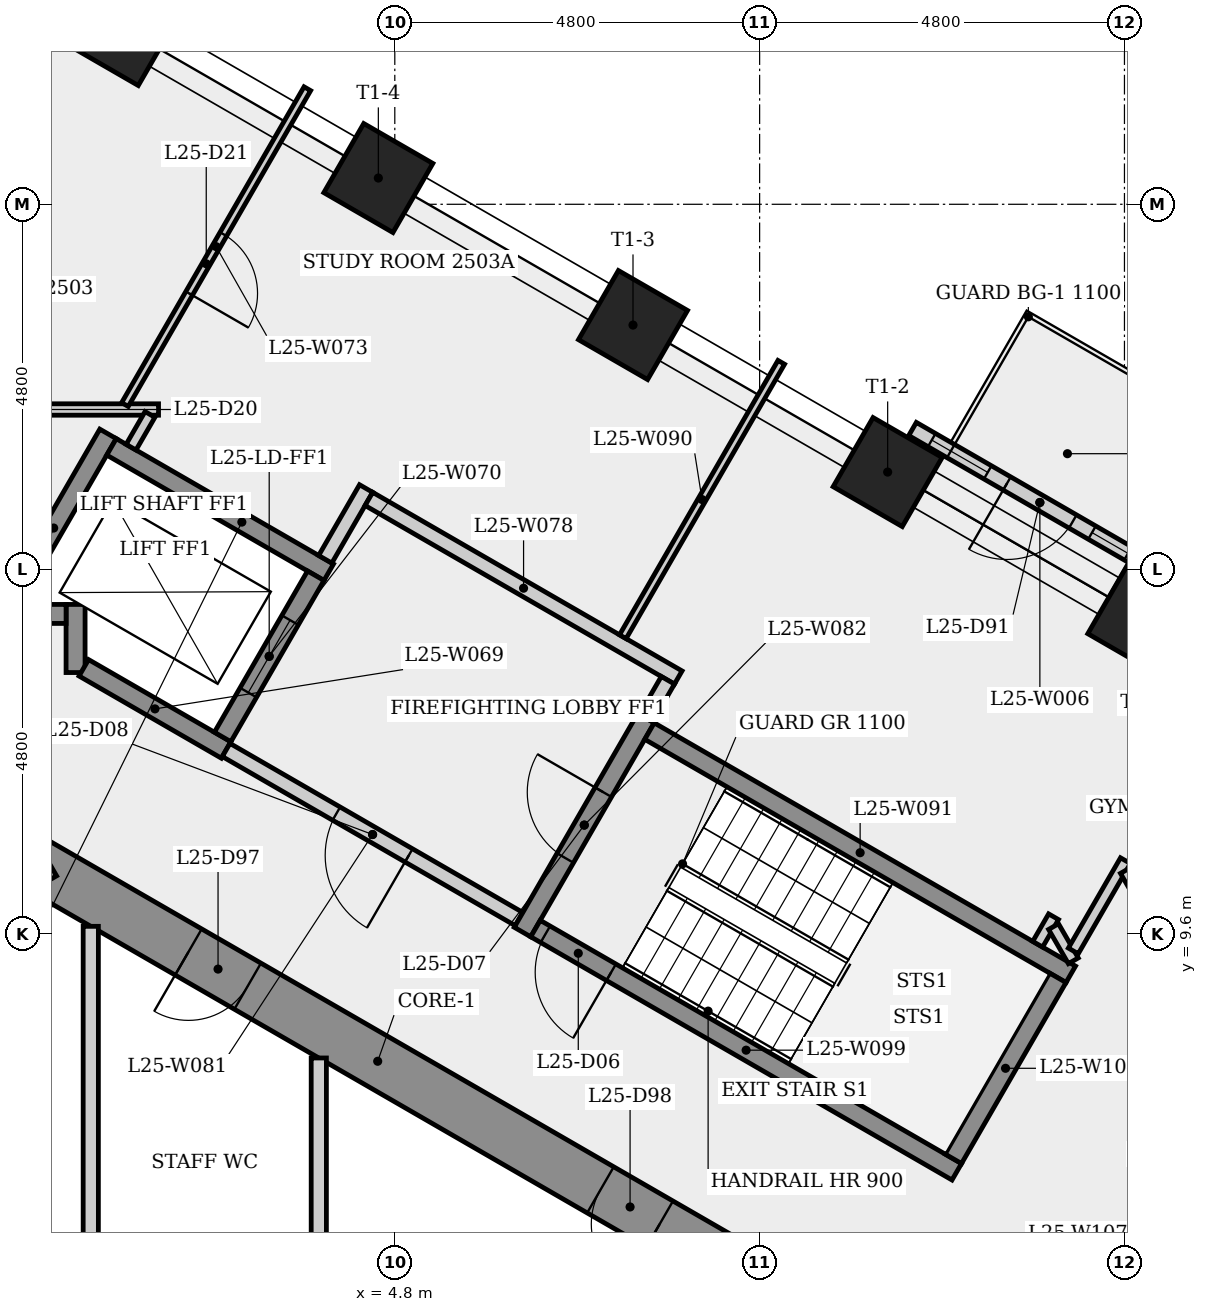
"""IFC4 building model, lengths in metres.
Left out: names, types, materials, properties, quantities, classifications, styles, units other than length and angle.
Written with IfcOpenShell. Run it as: python <this file> out.ifc"""

import sys

from ifc_helpers import new_model, si_unit, direction, frame, frame_2d, origin, origin_2d, place, context, subcontext, project, spatial, rectangle, extrude, element, fill, save


model = new_model("IFC4")
c1 = context("Model", 3, precision=1e-05, world=origin(), true_north=direction((0.0, 1.0)))
c2 = subcontext(c1, "Body", "Model", "MODEL_VIEW")
j1 = project(units=[si_unit("LENGTHUNIT", "METRE"), si_unit("PLANEANGLEUNIT", "RADIAN")], contexts=[c1])
p1 = place(None, origin())
s1 = spatial("IfcSite", under=j1, at=p1, CompositionType="ELEMENT")
p2 = place(p1, origin())
s2 = spatial("IfcBuilding", under=s1, at=p2, CompositionType="ELEMENT")
p3 = place(p2, frame((0.0, 0.0, 96.7)))
s3 = spatial("IfcBuildingStorey", under=s2, at=p3, CompositionType="ELEMENT", Elevation=96.7)
p4 = place(p3, frame((9.325, 5.182, 0.0), z_axis=(0.0, 0.0, 1.0), x_axis=(-0.866023993627, 0.500002442456, 0.0)))
e1 = element("IfcWall", 1, at=p4, inside=s3, PredefinedType="SHEAR", context=c2, shape_type="SweptSolid", body=[
    extrude(rectangle(XDim=10.97, YDim=0.7, at=frame_2d((5.485, 0.0))), origin(), (0.0, 0.0, 1.0), 3.4),
])
p5 = place(p4, frame((7.46, 0.0, 0.0)))
e2 = element("IfcOpeningElement", 2, at=p5, cuts=e1, PredefinedType="OPENING", context=c2, shape_type="SweptSolid", body=[
    extrude(rectangle(XDim=0.9, YDim=2.1, at=frame_2d((0.45, 1.05))), frame((0.0, 0.36, 0.0), z_axis=(0.0, -1.0, 0.0), x_axis=(1.0, 0.0, 0.0)), (0.0, 0.0, 1.0), 0.72),
])
p6 = place(p4, frame((1.201, 0.0, 0.0)))
e3 = element("IfcOpeningElement", 3, at=p6, cuts=e1, PredefinedType="OPENING", context=c2, shape_type="SweptSolid", body=[
    extrude(rectangle(XDim=0.9, YDim=2.1, at=frame_2d((0.45, 1.05))), frame((0.0, 0.36, 0.0), z_axis=(0.0, -1.0, 0.0), x_axis=(1.0, 0.0, 0.0)), (0.0, 0.0, 1.0), 0.72),
])
p7 = place(p3, frame((0.175, 10.667, 0.0), z_axis=(0.0, 0.0, 1.0), x_axis=(-0.866023993627, -0.500002442456, 0.0)))
e4 = element("IfcWall", 4, at=p7, inside=s3, PredefinedType="SHEAR", context=c2, shape_type="SweptSolid", body=[
    extrude(rectangle(XDim=10.97, YDim=0.7, at=frame_2d((5.485, 0.0))), origin(), (0.0, 0.0, 1.0), 3.4),
])
p8 = place(p7, frame((6.214, 0.0, 0.0)))
e5 = element("IfcOpeningElement", 5, at=p8, cuts=e4, PredefinedType="OPENING", context=c2, shape_type="SweptSolid", body=[
    extrude(rectangle(XDim=0.9, YDim=2.1, at=frame_2d((0.45, 1.05))), frame((0.0, 0.36, 0.0), z_axis=(0.0, -1.0, 0.0), x_axis=(1.0, 0.0, 0.0)), (0.0, 0.0, 1.0), 0.72),
])
for number, where, z_axis, x_axis in (
    (6, (14.635, 13.742, 0.0), (0.0, 0.0, 1.0), (0.5, 0.866, 0.0)),
    (7, (11.284, 15.677, 0.0), (0.0, 0.0, 1.0), (0.5, 0.866, 0.0)),
    (8, (7.934, 17.611, 0.0), (0.0, 0.0, 1.0), (0.5, 0.866, 0.0)),
    (9, (4.583, 19.545, 0.0), (0.0, 0.0, 1.0), (0.5, 0.866, 0.0)),
    (10, (1.233, 21.48, 0.0), (0.0, 0.0, 1.0), (0.5, 0.866, 0.0)),
):
    element("IfcColumn", number, at=place(p3, frame(where, z_axis=z_axis, x_axis=x_axis)), inside=s3, PredefinedType="COLUMN", context=c2, shape_type="SweptSolid", body=[
        extrude(rectangle(XDim=1.05, YDim=1.05, at=origin_2d()), origin(), (0.0, 0.0, 1.0), 3.4),
    ])
p9 = place(p3, frame((14.962, 14.309, 0.0), z_axis=(0.0, 0.0, 1.0), x_axis=(-0.866013246922, 0.500021055713, 0.0)))
e11 = element("IfcWall", 11, at=p9, inside=s3, PredefinedType="SOLIDWALL", context=c2, shape_type="SweptSolid", body=[
    extrude(rectangle(XDim=3.869, YDim=0.2, at=frame_2d((1.935, 0.0))), origin(), (0.0, 0.0, 1.0), 3.4),
])
p10 = place(p9, frame((1.435, 0.0, 0.0)))
e12 = element("IfcOpeningElement", 12, at=p10, cuts=e11, PredefinedType="OPENING", context=c2, shape_type="SweptSolid", body=[
    extrude(rectangle(XDim=1.0, YDim=2.4, at=frame_2d((0.5, 1.2))), frame((0.0, 0.11, 0.0), z_axis=(0.0, -1.0, 0.0), x_axis=(1.0, 0.0, 0.0)), (0.0, 0.0, 1.0), 0.22),
])
p11 = place(p9, frame((0.292, 0.0, 0.9)))
e13 = element("IfcOpeningElement", 13, at=p11, cuts=e11, PredefinedType="OPENING", context=c2, shape_type="SweptSolid", body=[
    extrude(rectangle(XDim=0.85, YDim=1.5, at=frame_2d((0.425, 0.75))), frame((0.0, 0.11, 0.0), z_axis=(0.0, -1.0, 0.0), x_axis=(1.0, 0.0, 0.0)), (0.0, 0.0, 1.0), 0.22),
])
p12 = place(p9, frame((2.727, 0.0, 0.9)))
e14 = element("IfcOpeningElement", 14, at=p12, cuts=e11, PredefinedType="OPENING", context=c2, shape_type="SweptSolid", body=[
    extrude(rectangle(XDim=0.85, YDim=1.5, at=frame_2d((0.425, 0.75))), frame((0.0, 0.11, 0.0), z_axis=(0.0, -1.0, 0.0), x_axis=(1.0, 0.0, 0.0)), (0.0, 0.0, 1.0), 0.22),
])
p13 = place(p3, frame((-3.275, 16.5, 0.0), z_axis=(0.0, 0.0, 1.0), x_axis=(1.0, 0.0, 0.0)))
e15 = element("IfcWall", 15, at=p13, inside=s3, PredefinedType="PARTITIONING", context=c2, shape_type="SweptSolid", body=[
    extrude(rectangle(XDim=4.966, YDim=0.15, at=frame_2d((2.483, 0.0))), origin(), (0.0, 0.0, 1.0), 3.05),
])
p14 = place(p13, frame((1.82, 0.0, 0.0)))
e16 = element("IfcOpeningElement", 16, at=p14, cuts=e15, PredefinedType="OPENING", context=c2, shape_type="SweptSolid", body=[
    extrude(rectangle(XDim=1.0, YDim=2.1, at=frame_2d((0.5, 1.05))), frame((0.0, 0.085, 0.0), z_axis=(0.0, -1.0, 0.0), x_axis=(1.0, 0.0, 0.0)), (0.0, 0.0, 1.0), 0.17),
])
p15 = place(p3, frame((-0.403, 13.702, 0.0), z_axis=(0.0, 0.0, 1.0), x_axis=(0.499976111731, 0.866039195244, 0.0)))
e17 = element("IfcWall", 17, at=p15, inside=s3, PredefinedType="SHEAR", context=c2, shape_type="SweptSolid", body=[
    extrude(rectangle(XDim=2.861, YDim=0.25, at=frame_2d((1.43, 0.0))), origin(), (0.0, 0.0, 1.0), 3.05),
])
p16 = place(p3, frame((0.6, 13.039, 0.0), z_axis=(0.0, 0.0, 1.0), x_axis=(0.0, 1.0, 0.0)))
e18 = element("IfcWall", 18, at=p16, inside=s3, PredefinedType="SHEAR", context=c2, shape_type="SweptSolid", body=[
    extrude(rectangle(XDim=0.896, YDim=0.25, at=frame_2d((0.448, 0.0))), origin(), (0.0, 0.0, 1.0), 3.05),
])
p17 = place(p3, frame((0.475, 13.81, 0.0), z_axis=(0.0, 0.0, 1.0), x_axis=(-1.0, 0.0, 0.0)))
e19 = element("IfcWall", 19, at=p17, inside=s3, PredefinedType="SHEAR", context=c2, shape_type="SweptSolid", body=[
    extrude(rectangle(XDim=0.691, YDim=0.25, at=frame_2d((0.345, 0.0))), origin(), (0.0, 0.0, 1.0), 3.4),
])
p18 = place(p3, frame((0.8, 9.699, 0.0), z_axis=(0.0, 0.0, 1.0), x_axis=(0.0, -1.0, 0.0)))
e20 = element("IfcWall", 20, at=p18, inside=s3, PredefinedType="PARTITIONING", context=c2, shape_type="SweptSolid", body=[
    extrude(rectangle(XDim=4.425, YDim=0.2, at=frame_2d((2.212, 0.0))), origin(), (0.0, 0.0, 1.0), 3.05),
])
p19 = place(p3, frame((1.073, 16.008, 0.0), z_axis=(0.0, 0.0, 1.0), x_axis=(0.866040211805, -0.499974350878, 0.0)))
e21 = element("IfcWall", 21, at=p19, inside=s3, PredefinedType="SHEAR", context=c2, shape_type="SweptSolid", body=[
    extrude(rectangle(XDim=3.3, YDim=0.25, at=frame_2d((1.65, 0.0))), origin(), (0.0, 0.0, 1.0), 3.05),
])
p20 = place(p3, frame((1.579, 16.435, 0.0), z_axis=(0.0, 0.0, 1.0), x_axis=(-0.500359323436, -0.865817848887, 0.0)))
e22 = element("IfcWall", 22, at=p20, inside=s3, PredefinedType="PARTITIONING", context=c2, shape_type="SweptSolid", body=[
    extrude(rectangle(XDim=0.498, YDim=0.15, at=frame_2d((0.249, 0.0))), origin(), (0.0, 0.0, 1.0), 3.05),
])
p21 = place(p3, frame((2.581, 12.02, 0.0), z_axis=(0.0, 0.0, 1.0), x_axis=(-0.86603892542, 0.499976579108, 0.0)))
e23 = element("IfcWall", 23, at=p21, inside=s3, PredefinedType="SHEAR", context=c2, shape_type="SweptSolid", body=[
    extrude(rectangle(XDim=2.162, YDim=0.25, at=frame_2d((1.081, 0.0))), origin(), (0.0, 0.0, 1.0), 3.05),
])
p22 = place(p3, frame((2.535, 12.191, 0.0), z_axis=(0.0, 0.0, 1.0), x_axis=(0.500061746146, 0.865989751695, 0.0)))
e24 = element("IfcWall", 24, at=p22, inside=s3, PredefinedType="SHEAR", context=c2, shape_type="SweptSolid", body=[
    extrude(rectangle(XDim=2.45, YDim=0.25, at=frame_2d((1.225, 0.0))), origin(), (0.0, 0.0, 1.0), 3.4),
])
p23 = place(p22, frame((0.675, 0.0, 0.0)))
e25 = element("IfcOpeningElement", 25, at=p23, cuts=e24, PredefinedType="OPENING", context=c2, shape_type="SweptSolid", body=[
    extrude(rectangle(XDim=1.1, YDim=2.1, at=frame_2d((0.55, 1.05))), frame((0.0, 0.135, 0.0), z_axis=(0.0, -1.0, 0.0), x_axis=(1.0, 0.0, 0.0)), (0.0, 0.0, 1.0), 0.27),
])
p24 = place(p3, frame((3.649, 20.721, 0.0), z_axis=(0.0, 0.0, 1.0), x_axis=(-0.499991085587, -0.866030550462, 0.0)))
e26 = element("IfcWall", 26, at=p24, inside=s3, PredefinedType="PARTITIONING", context=c2, shape_type="SweptSolid", body=[
    extrude(rectangle(XDim=4.799, YDim=0.1, at=frame_2d((2.399, 0.0))), origin(), (0.0, 0.0, 1.0), 3.05),
])
p25 = place(p24, frame((2.21, 0.0, 0.0)))
e27 = element("IfcOpeningElement", 27, at=p25, cuts=e26, PredefinedType="OPENING", context=c2, shape_type="SweptSolid", body=[
    extrude(rectangle(XDim=0.9, YDim=2.1, at=frame_2d((0.45, 1.05))), frame((0.0, 0.06, 0.0), z_axis=(0.0, -1.0, 0.0), x_axis=(1.0, 0.0, 0.0)), (0.0, 0.0, 1.0), 0.12),
])
p26 = place(p3, frame((3.8, 7.967, 0.0), z_axis=(0.0, 0.0, 1.0), x_axis=(0.0, -1.0, 0.0)))
e28 = element("IfcWall", 28, at=p26, inside=s3, PredefinedType="PARTITIONING", context=c2, shape_type="SweptSolid", body=[
    extrude(rectangle(XDim=2.692, YDim=0.2, at=frame_2d((1.346, 0.0))), origin(), (0.0, 0.0, 1.0), 3.05),
])
p27 = place(p3, frame((3.885, 14.529, 0.0), z_axis=(0.0, 0.0, 1.0), x_axis=(0.499997628298, 0.866026773083, 0.0)))
e29 = element("IfcWall", 29, at=p27, inside=s3, PredefinedType="PARTITIONING", context=c2, shape_type="SweptSolid", body=[
    extrude(rectangle(XDim=1.075, YDim=0.2, at=frame_2d((0.538, 0.0))), origin(), (0.0, 0.0, 1.0), 3.05),
])
p28 = place(p3, frame((4.459, 15.323, 0.0), z_axis=(0.0, 0.0, 1.0), x_axis=(0.866016039709, -0.500016218704, 0.0)))
e30 = element("IfcWall", 30, at=p28, inside=s3, PredefinedType="PARTITIONING", context=c2, shape_type="SweptSolid", body=[
    extrude(rectangle(XDim=4.7, YDim=0.2, at=frame_2d((2.35, 0.0))), origin(), (0.0, 0.0, 1.0), 3.05),
])
p29 = place(p3, frame((6.435, 9.795, 0.0), z_axis=(0.0, 0.0, 1.0), x_axis=(-0.866012907634, 0.500021643343, 0.0)))
e31 = element("IfcWall", 31, at=p29, inside=s3, PredefinedType="PARTITIONING", context=c2, shape_type="SweptSolid", body=[
    extrude(rectangle(XDim=4.45, YDim=0.2, at=frame_2d((2.225, 0.0))), origin(), (0.0, 0.0, 1.0), 3.05),
])
p30 = place(p29, frame((1.675, 0.0, 0.0)))
e32 = element("IfcOpeningElement", 32, at=p30, cuts=e31, PredefinedType="OPENING", context=c2, shape_type="SweptSolid", body=[
    extrude(rectangle(XDim=1.1, YDim=2.1, at=frame_2d((0.55, 1.05))), frame((0.0, 0.11, 0.0), z_axis=(0.0, -1.0, 0.0), x_axis=(1.0, 0.0, 0.0)), (0.0, 0.0, 1.0), 0.22),
])
p31 = place(p3, frame((6.48, 9.624, 0.0), z_axis=(0.0, 0.0, 1.0), x_axis=(0.500017246033, 0.866015446554, 0.0)))
e33 = element("IfcWall", 33, at=p31, inside=s3, PredefinedType="SHEAR", context=c2, shape_type="SweptSolid", body=[
    extrude(rectangle(XDim=3.25, YDim=0.25, at=frame_2d((1.625, 0.0))), origin(), (0.0, 0.0, 1.0), 3.05),
])
p32 = place(p31, frame((1.125, 0.0, 0.0)))
e34 = element("IfcOpeningElement", 34, at=p32, cuts=e33, PredefinedType="OPENING", context=c2, shape_type="SweptSolid", body=[
    extrude(rectangle(XDim=1.0, YDim=2.1, at=frame_2d((0.5, 1.05))), frame((0.0, 0.135, 0.0), z_axis=(0.0, -1.0, 0.0), x_axis=(1.0, 0.0, 0.0)), (0.0, 0.0, 1.0), 0.27),
])
p33 = place(p3, frame((7.8, 13.51, 0.0), z_axis=(0.0, 0.0, 1.0), x_axis=(0.499980976928, 0.866036386482, 0.0)))
e35 = element("IfcWall", 35, at=p33, inside=s3, PredefinedType="PARTITIONING", context=c2, shape_type="SweptSolid", body=[
    extrude(rectangle(XDim=4.169, YDim=0.1, at=frame_2d((2.084, 0.0))), origin(), (0.0, 0.0, 1.0), 3.05),
])
p34 = place(p3, frame((8.151, 12.268, 0.0), z_axis=(0.0, 0.0, 1.0), x_axis=(0.866025499775, -0.499999833739, 0.0)))
e36 = element("IfcWall", 36, at=p34, inside=s3, PredefinedType="SHEAR", context=c2, shape_type="SweptSolid", body=[
    extrude(rectangle(XDim=6.4, YDim=0.25, at=frame_2d((3.2, 0.0))), origin(), (0.0, 0.0, 1.0), 3.05),
])
p35 = place(p3, frame((8.393, 12.937, 0.0), z_axis=(0.0, 0.0, 1.0), x_axis=(-0.500065409566, -0.86598763626, 0.0)))
e37 = element("IfcWall", 37, at=p35, inside=s3, PredefinedType="PARTITIONING", context=c2, shape_type="SweptSolid", body=[
    extrude(rectangle(XDim=0.575, YDim=0.2, at=frame_2d((0.288, 0.0))), origin(), (0.0, 0.0, 1.0), 3.05),
])
p36 = place(p3, frame((12.194, 6.47, 0.0), z_axis=(0.0, 0.0, 1.0), x_axis=(-0.866025499775, 0.499999833739, 0.0)))
e38 = element("IfcWall", 38, at=p36, inside=s3, PredefinedType="SHEAR", context=c2, shape_type="SweptSolid", body=[
    extrude(rectangle(XDim=6.4, YDim=0.25, at=frame_2d((3.2, 0.0))), origin(), (0.0, 0.0, 1.0), 3.05),
])
p37 = place(p36, frame((5.25, 0.0, 0.0)))
e39 = element("IfcOpeningElement", 39, at=p37, cuts=e38, PredefinedType="OPENING", context=c2, shape_type="SweptSolid", body=[
    extrude(rectangle(XDim=1.0, YDim=2.1, at=frame_2d((0.5, 1.05))), frame((0.0, 0.135, 0.0), z_axis=(0.0, -1.0, 0.0), x_axis=(1.0, 0.0, 0.0)), (0.0, 0.0, 1.0), 0.27),
])
p38 = place(p3, frame((13.258, 9.464, 0.0), z_axis=(0.0, 0.0, 1.0), x_axis=(0.49990781971, 0.866078617559, 0.0)))
e40 = element("IfcWall", 40, at=p38, inside=s3, PredefinedType="PARTITIONING", context=c2, shape_type="SweptSolid", body=[
    extrude(rectangle(XDim=0.418, YDim=0.15, at=frame_2d((0.209, 0.0))), origin(), (0.0, 0.0, 1.0), 3.05),
])
p39 = place(p3, frame((13.467, 9.696, 0.0), z_axis=(0.0, 0.0, 1.0), x_axis=(0.499980071345, -0.866036909293, 0.0)))
e41 = element("IfcWall", 41, at=p39, inside=s3, PredefinedType="PARTITIONING", context=c2, shape_type="SweptSolid", body=[
    extrude(rectangle(XDim=0.52, YDim=0.15, at=frame_2d((0.26, 0.0))), origin(), (0.0, 0.0, 1.0), 3.05),
])
p40 = place(p3, frame((13.523, 9.022, 0.0), z_axis=(0.0, 0.0, 1.0), x_axis=(-0.500034990121, -0.866005201286, 0.0)))
e42 = element("IfcWall", 42, at=p40, inside=s3, PredefinedType="SHEAR", context=c2, shape_type="SweptSolid", body=[
    extrude(rectangle(XDim=2.75, YDim=0.25, at=frame_2d((1.375, 0.0))), origin(), (0.0, 0.0, 1.0), 3.05),
])
p41 = place(p3, frame((13.727, 9.376, 0.0), z_axis=(0.0, 0.0, 1.0), x_axis=(0.500025491523, 0.866010685746, 0.0)))
e43 = element("IfcWall", 43, at=p41, inside=s3, PredefinedType="PARTITIONING", context=c2, shape_type="SweptSolid", body=[
    extrude(rectangle(XDim=1.372, YDim=0.15, at=frame_2d((0.686, 0.0))), origin(), (0.0, 0.0, 1.0), 3.05),
])
p42 = place(p3, frame((14.413, 10.434, 0.0), z_axis=(0.0, 0.0, 1.0), x_axis=(0.49999591573, -0.866027761826, 0.0)))
e44 = element("IfcWall", 44, at=p42, inside=s3, PredefinedType="PARTITIONING", context=c2, shape_type="SweptSolid", body=[
    extrude(rectangle(XDim=5.719, YDim=0.15, at=frame_2d((2.859, 0.0))), origin(), (0.0, 0.0, 1.0), 3.05),
])
p43 = place(p42, frame((2.304, 0.0, 0.0)))
e45 = element("IfcOpeningElement", 45, at=p43, cuts=e44, PredefinedType="OPENING", context=c2, shape_type="SweptSolid", body=[
    extrude(rectangle(XDim=1.0, YDim=2.1, at=frame_2d((0.5, 1.05))), frame((0.0, 0.085, 0.0), z_axis=(0.0, -1.0, 0.0), x_axis=(1.0, 0.0, 0.0)), (0.0, 0.0, 1.0), 0.17),
])
p44 = place(p10, origin())
e46 = element("IfcDoor", 46, at=p44, inside=s3, OperationType="SINGLE_SWING_RIGHT", PredefinedType="DOOR", context=c2, shape_type="SweptSolid", body=[
    extrude(rectangle(XDim=1.0, YDim=2.4, at=frame_2d((0.5, 1.2))), frame((0.0, 0.025, 0.0), z_axis=(0.0, -1.0, 0.0), x_axis=(1.0, 0.0, 0.0)), (0.0, 0.0, 1.0), 0.05),
])
fill(e12, e46)
p45 = place(p11, origin())
e47 = element("IfcWindow", 47, at=p45, inside=s3, PartitioningType="SINGLE_PANEL", PredefinedType="WINDOW", context=c2, shape_type="SweptSolid", body=[
    extrude(rectangle(XDim=0.85, YDim=1.5, at=frame_2d((0.425, 0.75))), frame((0.0, 0.03, 0.0), z_axis=(0.0, -1.0, 0.0), x_axis=(1.0, 0.0, 0.0)), (0.0, 0.0, 1.0), 0.06),
])
fill(e13, e47)
p46 = place(p12, origin())
e48 = element("IfcWindow", 48, at=p46, inside=s3, PartitioningType="SINGLE_PANEL", PredefinedType="WINDOW", context=c2, shape_type="SweptSolid", body=[
    extrude(rectangle(XDim=0.85, YDim=1.5, at=frame_2d((0.425, 0.75))), frame((0.0, 0.03, 0.0), z_axis=(0.0, -1.0, 0.0), x_axis=(1.0, 0.0, 0.0)), (0.0, 0.0, 1.0), 0.06),
])
fill(e14, e48)
p47 = place(p37, origin())
e49 = element("IfcDoor", 49, at=p47, inside=s3, OperationType="SINGLE_SWING_LEFT", PredefinedType="DOOR", context=c2, shape_type="SweptSolid", body=[
    extrude(rectangle(XDim=1.0, YDim=2.1, at=frame_2d((0.5, 1.05))), frame((0.0, 0.025, 0.0), z_axis=(0.0, -1.0, 0.0), x_axis=(1.0, 0.0, 0.0)), (0.0, 0.0, 1.0), 0.05),
])
fill(e39, e49)
p48 = place(p32, origin())
e50 = element("IfcDoor", 50, at=p48, inside=s3, OperationType="SINGLE_SWING_RIGHT", PredefinedType="DOOR", context=c2, shape_type="SweptSolid", body=[
    extrude(rectangle(XDim=1.0, YDim=2.1, at=frame_2d((0.5, 1.05))), frame((0.0, 0.025, 0.0), z_axis=(0.0, -1.0, 0.0), x_axis=(1.0, 0.0, 0.0)), (0.0, 0.0, 1.0), 0.05),
])
fill(e34, e50)
p49 = place(p30, origin())
e51 = element("IfcDoor", 51, at=p49, inside=s3, OperationType="SINGLE_SWING_LEFT", PredefinedType="DOOR", context=c2, shape_type="SweptSolid", body=[
    extrude(rectangle(XDim=1.1, YDim=2.1, at=frame_2d((0.55, 1.05))), frame((0.0, 0.025, 0.0), z_axis=(0.0, -1.0, 0.0), x_axis=(1.0, 0.0, 0.0)), (0.0, 0.0, 1.0), 0.05),
])
fill(e32, e51)
p50 = place(p23, origin())
e52 = element("IfcDoor", 52, at=p50, inside=s3, OperationType="SLIDING_TO_LEFT", PredefinedType="DOOR", context=c2, shape_type="SweptSolid", body=[
    extrude(rectangle(XDim=1.1, YDim=2.1, at=frame_2d((0.55, 1.05))), frame((0.0, 0.025, 0.0), z_axis=(0.0, -1.0, 0.0), x_axis=(1.0, 0.0, 0.0)), (0.0, 0.0, 1.0), 0.05),
])
fill(e25, e52)
p51 = place(p25, origin())
e53 = element("IfcDoor", 53, at=p51, inside=s3, OperationType="SINGLE_SWING_RIGHT", PredefinedType="DOOR", context=c2, shape_type="SweptSolid", body=[
    extrude(rectangle(XDim=0.9, YDim=2.1, at=frame_2d((0.45, 1.05))), frame((0.0, 0.025, 0.0), z_axis=(0.0, -1.0, 0.0), x_axis=(1.0, 0.0, 0.0)), (0.0, 0.0, 1.0), 0.05),
])
fill(e27, e53)
p52 = place(p5, origin())
e54 = element("IfcDoor", 54, at=p52, inside=s3, OperationType="SINGLE_SWING_RIGHT", PredefinedType="DOOR", context=c2, shape_type="SweptSolid", body=[
    extrude(rectangle(XDim=0.9, YDim=2.1, at=frame_2d((0.45, 1.05))), frame((0.0, 0.025, 0.0), z_axis=(0.0, -1.0, 0.0), x_axis=(1.0, 0.0, 0.0)), (0.0, 0.0, 1.0), 0.05),
])
fill(e2, e54)
p53 = place(p6, origin())
e55 = element("IfcDoor", 55, at=p53, inside=s3, OperationType="SINGLE_SWING_LEFT", PredefinedType="DOOR", context=c2, shape_type="SweptSolid", body=[
    extrude(rectangle(XDim=0.9, YDim=2.1, at=frame_2d((0.45, 1.05))), frame((0.0, 0.025, 0.0), z_axis=(0.0, -1.0, 0.0), x_axis=(1.0, 0.0, 0.0)), (0.0, 0.0, 1.0), 0.05),
])
fill(e3, e55)
save(model, sys.argv[1])
